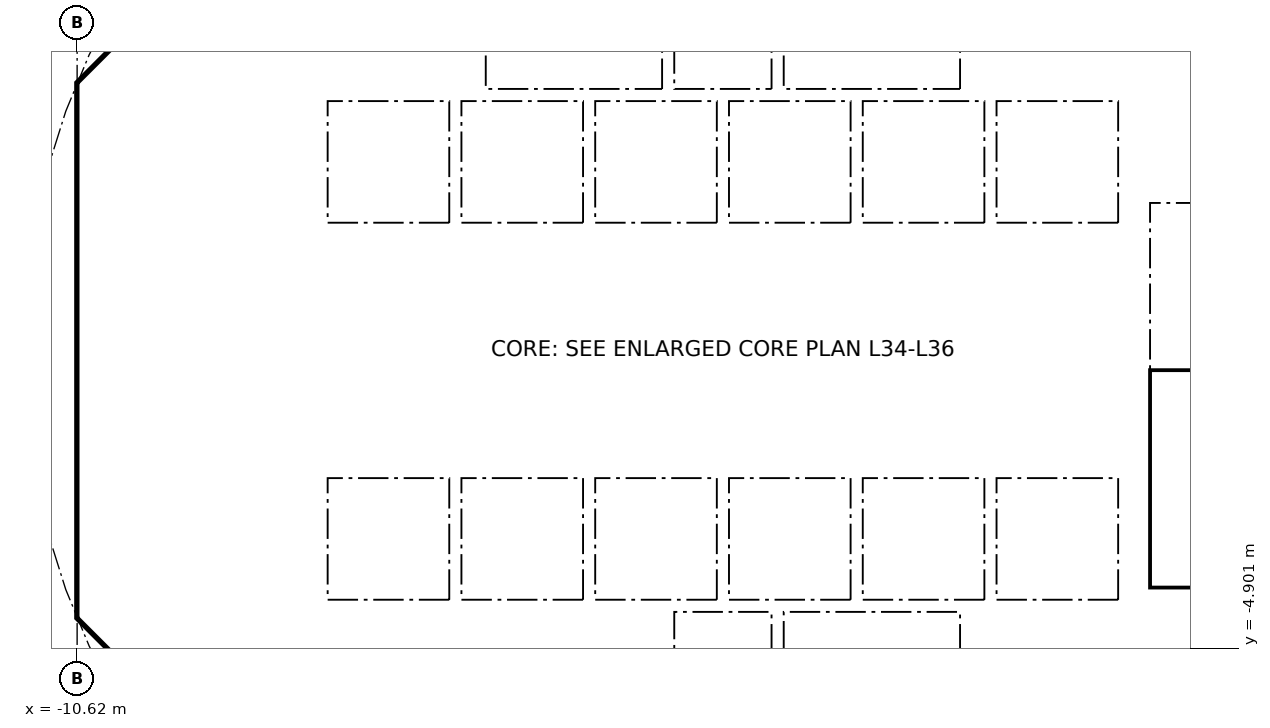
"""IFC4 building model, lengths in metres.
Left out: names, types, materials, properties, quantities, classifications, styles, units other than length and angle.
Written with IfcOpenShell. Run it as: python <this file> out.ifc"""

import sys

from ifc_helpers import new_model, si_unit, direction, frame, frame_2d, origin, place, context, subcontext, project, spatial, polyline, rectangle, outline, extrude, element, fill, save


model = new_model("IFC4")
c1 = context("Model", 3, precision=1e-05, world=origin(), true_north=direction((0.0, 1.0)))
c2 = subcontext(c1, "Body", "Model", "MODEL_VIEW")
j1 = project(units=[si_unit("LENGTHUNIT", "METRE"), si_unit("PLANEANGLEUNIT", "RADIAN")], contexts=[c1])
p1 = place(None, origin())
s1 = spatial("IfcSite", under=j1, at=p1, CompositionType="ELEMENT")
p2 = place(p1, origin())
s2 = spatial("IfcBuilding", under=s1, at=p2, CompositionType="ELEMENT")
p3 = place(p2, frame((0.0, 0.0, 141.8)))
s3 = spatial("IfcBuildingStorey", under=s2, at=p3, CompositionType="ELEMENT", Elevation=141.8)
p4 = place(p3, frame((9.988, 4.613, 0.0), z_axis=(0.0, 0.0, 1.0), x_axis=(-0.707106781187, 0.707106781187, 0.0)))
e1 = element("IfcWall", 1, at=p4, inside=s3, PredefinedType="SHEAR", context=c2, shape_type="SweptSolid", body=[
    extrude(rectangle(XDim=7.602, YDim=0.6, at=frame_2d((3.801, 0.0))), origin(), (0.0, 0.0, 1.0), 3.44),
])
p5 = place(p4, frame((3.201, 0.0, 0.0)))
e2 = element("IfcOpeningElement", 2, at=p5, cuts=e1, PredefinedType="OPENING", context=c2, shape_type="SweptSolid", body=[
    extrude(rectangle(XDim=1.2, YDim=2.1, at=frame_2d((0.6, 1.05))), frame((0.0, 0.31, 0.0), z_axis=(0.0, -1.0, 0.0), x_axis=(1.0, 0.0, 0.0)), (0.0, 0.0, 1.0), 0.62),
])
p6 = place(p3, frame((-4.613, 9.988, 0.0), z_axis=(0.0, 0.0, 1.0), x_axis=(-0.707106781187, -0.707106781187, 0.0)))
e3 = element("IfcWall", 3, at=p6, inside=s3, PredefinedType="SHEAR", context=c2, shape_type="SweptSolid", body=[
    extrude(rectangle(XDim=7.602, YDim=0.6, at=frame_2d((3.801, 0.0))), origin(), (0.0, 0.0, 1.0), 3.44),
])
p7 = place(p6, frame((0.351, 0.0, 0.0)))
e4 = element("IfcOpeningElement", 4, at=p7, cuts=e3, PredefinedType="OPENING", context=c2, shape_type="SweptSolid", body=[
    extrude(rectangle(XDim=1.1, YDim=2.1, at=frame_2d((0.55, 1.05))), frame((0.0, 0.31, 0.0), z_axis=(0.0, -1.0, 0.0), x_axis=(1.0, 0.0, 0.0)), (0.0, 0.0, 1.0), 0.62),
])
p8 = place(p3, frame((-10.325, 3.801, 0.0), z_axis=(0.0, 0.0, 1.0), x_axis=(0.0, -1.0, 0.0)))
e5 = element("IfcWall", 5, at=p8, inside=s3, PredefinedType="SHEAR", context=c2, shape_type="SweptSolid", body=[
    extrude(rectangle(XDim=7.602, YDim=0.6, at=frame_2d((3.801, 0.0))), origin(), (0.0, 0.0, 1.0), 3.44),
])
p9 = place(p8, frame((0.651, 0.0, 0.0)))
e6 = element("IfcOpeningElement", 6, at=p9, cuts=e5, PredefinedType="OPENING", context=c2, shape_type="SweptSolid", body=[
    extrude(rectangle(XDim=1.5, YDim=2.1, at=frame_2d((0.75, 1.05))), frame((0.0, 0.31, 0.0), z_axis=(0.0, -1.0, 0.0), x_axis=(1.0, 0.0, 0.0)), (0.0, 0.0, 1.0), 0.62),
])
p10 = place(p8, frame((5.451, 0.0, 0.0)))
e7 = element("IfcOpeningElement", 7, at=p10, cuts=e5, PredefinedType="OPENING", context=c2, shape_type="SweptSolid", body=[
    extrude(rectangle(XDim=1.5, YDim=2.1, at=frame_2d((0.75, 1.05))), frame((0.0, 0.31, 0.0), z_axis=(0.0, -1.0, 0.0), x_axis=(1.0, 0.0, 0.0)), (0.0, 0.0, 1.0), 0.62),
])
p11 = place(p3, frame((-9.988, -4.613, 0.0), z_axis=(0.0, 0.0, 1.0), x_axis=(0.707106781187, -0.707106781187, 0.0)))
e8 = element("IfcWall", 8, at=p11, inside=s3, PredefinedType="SHEAR", context=c2, shape_type="SweptSolid", body=[
    extrude(rectangle(XDim=7.602, YDim=0.6, at=frame_2d((3.801, 0.0))), origin(), (0.0, 0.0, 1.0), 3.44),
])
p12 = place(p11, frame((6.151, 0.0, 0.0)))
e9 = element("IfcOpeningElement", 9, at=p12, cuts=e8, PredefinedType="OPENING", context=c2, shape_type="SweptSolid", body=[
    extrude(rectangle(XDim=1.1, YDim=2.1, at=frame_2d((0.55, 1.05))), frame((0.0, 0.31, 0.0), z_axis=(0.0, -1.0, 0.0), x_axis=(1.0, 0.0, 0.0)), (0.0, 0.0, 1.0), 0.62),
])
p13 = place(p3, frame((4.613, -9.988, 0.0), z_axis=(0.0, 0.0, 1.0), x_axis=(0.707106781187, 0.707106781187, 0.0)))
e10 = element("IfcWall", 10, at=p13, inside=s3, PredefinedType="SHEAR", context=c2, shape_type="SweptSolid", body=[
    extrude(rectangle(XDim=7.602, YDim=0.6, at=frame_2d((3.801, 0.0))), origin(), (0.0, 0.0, 1.0), 3.44),
])
p14 = place(p13, frame((3.201, 0.0, 0.0)))
e11 = element("IfcOpeningElement", 11, at=p14, cuts=e10, PredefinedType="OPENING", context=c2, shape_type="SweptSolid", body=[
    extrude(rectangle(XDim=1.2, YDim=2.1, at=frame_2d((0.6, 1.05))), frame((0.0, 0.31, 0.0), z_axis=(0.0, -1.0, 0.0), x_axis=(1.0, 0.0, 0.0)), (0.0, 0.0, 1.0), 0.62),
])
p15 = place(p3, frame((-5.8, 4.3, 0.0), z_axis=(0.0, 0.0, 1.0), x_axis=(0.0, 1.0, 0.0)))
e12 = element("IfcWall", 12, at=p15, inside=s3, PredefinedType="PARTITIONING", context=c2, shape_type="SweptSolid", body=[
    extrude(rectangle(XDim=3.927, YDim=0.15, at=frame_2d((1.963, 0.0))), origin(), (0.0, 0.0, 1.0), 3.44),
])
p16 = place(p15, frame((0.413, 0.0, 0.0)))
e13 = element("IfcOpeningElement", 13, at=p16, cuts=e12, PredefinedType="OPENING", context=c2, shape_type="SweptSolid", body=[
    extrude(rectangle(XDim=0.9, YDim=2.1, at=frame_2d((0.45, 1.05))), frame((0.0, 0.085, 0.0), z_axis=(0.0, -1.0, 0.0), x_axis=(1.0, 0.0, 0.0)), (0.0, 0.0, 1.0), 0.17),
])
p17 = place(p15, frame((2.489, 0.0, 0.0)))
e14 = element("IfcOpeningElement", 14, at=p17, cuts=e12, PredefinedType="OPENING", context=c2, shape_type="SweptSolid", body=[
    extrude(rectangle(XDim=0.9, YDim=2.1, at=frame_2d((0.45, 1.05))), frame((0.0, 0.085, 0.0), z_axis=(0.0, -1.0, 0.0), x_axis=(1.0, 0.0, 0.0)), (0.0, 0.0, 1.0), 0.17),
])
p18 = place(p3, frame((4.0, 4.3, 0.0), z_axis=(0.0, 0.0, 1.0), x_axis=(0.0, 1.0, 0.0)))
e15 = element("IfcWall", 15, at=p18, inside=s3, PredefinedType="SOLIDWALL", context=c2, shape_type="SweptSolid", body=[
    extrude(rectangle(XDim=2.2, YDim=0.2, at=frame_2d((1.1, 0.0))), origin(), (0.0, 0.0, 1.0), 3.44),
])
p19 = place(p18, frame((0.55, 0.0, 0.0)))
e16 = element("IfcOpeningElement", 16, at=p19, cuts=e15, PredefinedType="OPENING", context=c2, shape_type="SweptSolid", body=[
    extrude(rectangle(XDim=1.1, YDim=2.1, at=frame_2d((0.55, 1.05))), frame((0.0, 0.11, 0.0), z_axis=(0.0, -1.0, 0.0), x_axis=(1.0, 0.0, 0.0)), (0.0, 0.0, 1.0), 0.22),
])
p20 = place(p3, frame((-4.0, 4.3, 0.0), z_axis=(0.0, 0.0, 1.0), x_axis=(0.0, 1.0, 0.0)))
e17 = element("IfcWall", 17, at=p20, inside=s3, PredefinedType="SOLIDWALL", context=c2, shape_type="SweptSolid", body=[
    extrude(rectangle(XDim=2.2, YDim=0.2, at=frame_2d((1.1, 0.0))), origin(), (0.0, 0.0, 1.0), 3.44),
])
p21 = place(p20, frame((0.55, 0.0, 0.0)))
e18 = element("IfcOpeningElement", 18, at=p21, cuts=e17, PredefinedType="OPENING", context=c2, shape_type="SweptSolid", body=[
    extrude(rectangle(XDim=1.1, YDim=2.1, at=frame_2d((0.55, 1.05))), frame((0.0, 0.11, 0.0), z_axis=(0.0, -1.0, 0.0), x_axis=(1.0, 0.0, 0.0)), (0.0, 0.0, 1.0), 0.22),
])
p22 = place(p3, frame((-6.7, 2.0, 0.0), z_axis=(0.0, 0.0, 1.0), x_axis=(1.0, 0.0, 0.0)))
e19 = element("IfcWall", 19, at=p22, inside=s3, PredefinedType="SOLIDWALL", context=c2, shape_type="SweptSolid", body=[
    extrude(rectangle(XDim=13.4, YDim=0.2, at=frame_2d((6.7, 0.0))), origin(), (0.0, 0.0, 1.0), 3.44),
])
p23 = place(p22, frame((0.65, 0.0, 0.0)))
e20 = element("IfcOpeningElement", 20, at=p23, cuts=e19, PredefinedType="OPENING", context=c2, shape_type="SweptSolid", body=[
    extrude(rectangle(XDim=1.1, YDim=2.1, at=frame_2d((0.55, 1.05))), frame((0.0, 0.11, 0.0), z_axis=(0.0, -1.0, 0.0), x_axis=(1.0, 0.0, 0.0)), (0.0, 0.0, 1.0), 0.22),
])
p24 = place(p22, frame((2.85, 0.0, 0.0)))
e21 = element("IfcOpeningElement", 21, at=p24, cuts=e19, PredefinedType="OPENING", context=c2, shape_type="SweptSolid", body=[
    extrude(rectangle(XDim=1.1, YDim=2.1, at=frame_2d((0.55, 1.05))), frame((0.0, 0.11, 0.0), z_axis=(0.0, -1.0, 0.0), x_axis=(1.0, 0.0, 0.0)), (0.0, 0.0, 1.0), 0.22),
])
p25 = place(p22, frame((5.05, 0.0, 0.0)))
e22 = element("IfcOpeningElement", 22, at=p25, cuts=e19, PredefinedType="OPENING", context=c2, shape_type="SweptSolid", body=[
    extrude(rectangle(XDim=1.1, YDim=2.1, at=frame_2d((0.55, 1.05))), frame((0.0, 0.11, 0.0), z_axis=(0.0, -1.0, 0.0), x_axis=(1.0, 0.0, 0.0)), (0.0, 0.0, 1.0), 0.22),
])
p26 = place(p3, frame((6.7, 4.0, 0.0), z_axis=(0.0, 0.0, 1.0), x_axis=(1.0, 0.0, 0.0)))
e23 = element("IfcWall", 23, at=p26, inside=s3, PredefinedType="SOLIDWALL", context=c2, shape_type="SweptSolid", body=[
    extrude(rectangle(XDim=3.325, YDim=0.2, at=frame_2d((1.662, 0.0))), origin(), (0.0, 0.0, 1.0), 3.44),
])
p27 = place(p26, frame((1.25, 0.0, 0.0)))
e24 = element("IfcOpeningElement", 24, at=p27, cuts=e23, PredefinedType="OPENING", context=c2, shape_type="SweptSolid", body=[
    extrude(rectangle(XDim=1.1, YDim=2.1, at=frame_2d((0.55, 1.05))), frame((0.0, 0.11, 0.0), z_axis=(0.0, -1.0, 0.0), x_axis=(1.0, 0.0, 0.0)), (0.0, 0.0, 1.0), 0.22),
])
p28 = place(p3, frame((-7.0, -7.027, 0.0), z_axis=(0.0, 0.0, 1.0), x_axis=(0.0, 1.0, 0.0)))
e25 = element("IfcWall", 25, at=p28, inside=s3, PredefinedType="PARTITIONING", context=c2, shape_type="SweptSolid", body=[
    extrude(rectangle(XDim=2.927, YDim=0.15, at=frame_2d((1.463, 0.0))), origin(), (0.0, 0.0, 1.0), 3.44),
])
p29 = place(p28, frame((0.976, 0.0, 0.0)))
e26 = element("IfcOpeningElement", 26, at=p29, cuts=e25, PredefinedType="OPENING", context=c2, shape_type="SweptSolid", body=[
    extrude(rectangle(XDim=0.9, YDim=2.1, at=frame_2d((0.45, 1.05))), frame((0.0, 0.085, 0.0), z_axis=(0.0, -1.0, 0.0), x_axis=(1.0, 0.0, 0.0)), (0.0, 0.0, 1.0), 0.17),
])
p30 = place(p3, frame((4.0, -6.5, 0.0), z_axis=(0.0, 0.0, 1.0), x_axis=(0.0, 1.0, 0.0)))
e27 = element("IfcWall", 27, at=p30, inside=s3, PredefinedType="SOLIDWALL", context=c2, shape_type="SweptSolid", body=[
    extrude(rectangle(XDim=2.2, YDim=0.2, at=frame_2d((1.1, 0.0))), origin(), (0.0, 0.0, 1.0), 3.44),
])
p31 = place(p30, frame((0.55, 0.0, 0.0)))
e28 = element("IfcOpeningElement", 28, at=p31, cuts=e27, PredefinedType="OPENING", context=c2, shape_type="SweptSolid", body=[
    extrude(rectangle(XDim=1.1, YDim=2.1, at=frame_2d((0.55, 1.05))), frame((0.0, 0.11, 0.0), z_axis=(0.0, -1.0, 0.0), x_axis=(1.0, 0.0, 0.0)), (0.0, 0.0, 1.0), 0.22),
])
p32 = place(p3, frame((-4.0, -6.5, 0.0), z_axis=(0.0, 0.0, 1.0), x_axis=(0.0, 1.0, 0.0)))
e29 = element("IfcWall", 29, at=p32, inside=s3, PredefinedType="SOLIDWALL", context=c2, shape_type="SweptSolid", body=[
    extrude(rectangle(XDim=2.2, YDim=0.2, at=frame_2d((1.1, 0.0))), origin(), (0.0, 0.0, 1.0), 3.44),
])
p33 = place(p32, frame((0.65, 0.0, 0.0)))
e30 = element("IfcOpeningElement", 30, at=p33, cuts=e29, PredefinedType="OPENING", context=c2, shape_type="SweptSolid", body=[
    extrude(rectangle(XDim=0.9, YDim=2.1, at=frame_2d((0.45, 1.05))), frame((0.0, 0.11, 0.0), z_axis=(0.0, -1.0, 0.0), x_axis=(1.0, 0.0, 0.0)), (0.0, 0.0, 1.0), 0.22),
])
p34 = place(p3, frame((-6.7, -2.0, 0.0), z_axis=(0.0, 0.0, 1.0), x_axis=(1.0, 0.0, 0.0)))
e31 = element("IfcWall", 31, at=p34, inside=s3, PredefinedType="SOLIDWALL", context=c2, shape_type="SweptSolid", body=[
    extrude(rectangle(XDim=13.4, YDim=0.2, at=frame_2d((6.7, 0.0))), origin(), (0.0, 0.0, 1.0), 3.44),
])
p35 = place(p34, frame((0.65, 0.0, 0.0)))
e32 = element("IfcOpeningElement", 32, at=p35, cuts=e31, PredefinedType="OPENING", context=c2, shape_type="SweptSolid", body=[
    extrude(rectangle(XDim=1.1, YDim=2.1, at=frame_2d((0.55, 1.05))), frame((0.0, 0.11, 0.0), z_axis=(0.0, -1.0, 0.0), x_axis=(1.0, 0.0, 0.0)), (0.0, 0.0, 1.0), 0.22),
])
p36 = place(p34, frame((2.85, 0.0, 0.0)))
e33 = element("IfcOpeningElement", 33, at=p36, cuts=e31, PredefinedType="OPENING", context=c2, shape_type="SweptSolid", body=[
    extrude(rectangle(XDim=1.1, YDim=2.1, at=frame_2d((0.55, 1.05))), frame((0.0, 0.11, 0.0), z_axis=(0.0, -1.0, 0.0), x_axis=(1.0, 0.0, 0.0)), (0.0, 0.0, 1.0), 0.22),
])
p37 = place(p3, origin())
e34 = element("IfcWall", 34, at=p37, inside=s3, PredefinedType="SHEAR", context=c2, shape_type="SweptSolid", body=[
    extrude(outline(polyline([(-10.625, -3.801), (-10.025, -3.801), (-10.025, -4.152), (-9.776, -4.401), (-10.2, -4.825), (-10.625, -4.401), (-10.625, -3.801)])), origin(), (0.0, 0.0, 1.0), 3.44),
])
p38 = place(p3, origin())
e35 = element("IfcWall", 35, at=p38, inside=s3, PredefinedType="SHEAR", context=c2, shape_type="SweptSolid", body=[
    extrude(outline(polyline([(-10.2, 4.825), (-9.776, 4.401), (-10.025, 4.152), (-10.025, 3.801), (-10.625, 3.801), (-10.625, 4.401), (-10.2, 4.825)])), origin(), (0.0, 0.0, 1.0), 3.44),
])
for number, where, z_axis, x_axis in (
    (36, (-10.025, -4.0, 0.0), (0.0, 0.0, 1.0), (1.0, 0.0, 0.0)),
    (37, (-10.025, 4.0, 0.0), (0.0, 0.0, 1.0), (1.0, 0.0, 0.0)),
):
    element("IfcWall", number, at=place(p3, frame(where, z_axis=z_axis, x_axis=x_axis)), inside=s3, PredefinedType="PARTITIONING", context=c2, shape_type="SweptSolid", body=[
        extrude(rectangle(XDim=3.325, YDim=0.2, at=frame_2d((1.662, 0.0))), origin(), (0.0, 0.0, 1.0), 3.44),
    ])
for number, where, z_axis, x_axis in (
    (38, (-0.9, -6.5, 0.0), (0.0, 0.0, 1.0), (0.0, 1.0, 0.0)),
    (39, (0.9, -6.5, 0.0), (0.0, 0.0, 1.0), (0.0, 1.0, 0.0)),
):
    element("IfcWall", number, at=place(p3, frame(where, z_axis=z_axis, x_axis=x_axis)), inside=s3, PredefinedType="SOLIDWALL", context=c2, shape_type="SweptSolid", body=[
        extrude(rectangle(XDim=2.2, YDim=0.2, at=frame_2d((1.1, 0.0))), origin(), (0.0, 0.0, 1.0), 3.44),
    ])
p39 = place(p3, origin())
e40 = element("IfcWall", 40, at=p39, inside=s3, PredefinedType="SOLIDWALL", context=c2, shape_type="SweptSolid", body=[
    extrude(outline(polyline([(-6.7, -2.1), (-6.5, -2.1), (-6.5, -4.1), (-4.5, -4.1), (-4.5, -2.1), (-4.3, -2.1), (-4.3, -4.1), (-2.3, -4.1), (-2.3, -2.1), (-2.1, -2.1), (-2.1, -4.1), (-0.1, -4.1), (-0.1, -2.1), (0.1, -2.1), (0.1, -4.1), (2.1, -4.1), (2.1, -2.1), (2.3, -2.1), (2.3, -4.1), (4.3, -4.1), (4.3, -2.1), (4.5, -2.1), (4.5, -4.1), (6.5, -4.1), (6.5, -2.1), (6.7, -2.1), (6.7, -4.3), (-6.7, -4.3), (-6.7, -2.1)])), origin(), (0.0, 0.0, 1.0), 3.44),
])
for number, where, z_axis, x_axis in (
    (41, (-0.9, 4.3, 0.0), (0.0, 0.0, 1.0), (0.0, 1.0, 0.0)),
    (42, (0.9, 4.3, 0.0), (0.0, 0.0, 1.0), (0.0, 1.0, 0.0)),
):
    element("IfcWall", number, at=place(p3, frame(where, z_axis=z_axis, x_axis=x_axis)), inside=s3, PredefinedType="SOLIDWALL", context=c2, shape_type="SweptSolid", body=[
        extrude(rectangle(XDim=2.2, YDim=0.2, at=frame_2d((1.1, 0.0))), origin(), (0.0, 0.0, 1.0), 3.44),
    ])
p40 = place(p3, origin())
e43 = element("IfcWall", 43, at=p40, inside=s3, PredefinedType="SOLIDWALL", context=c2, shape_type="SweptSolid", body=[
    extrude(outline(polyline([(-6.5, 2.1), (-6.7, 2.1), (-6.7, 4.3), (6.7, 4.3), (6.7, 2.1), (6.5, 2.1), (6.5, 4.1), (4.5, 4.1), (4.5, 2.1), (4.3, 2.1), (4.3, 4.1), (2.3, 4.1), (2.3, 2.1), (2.1, 2.1), (2.1, 4.1), (0.1, 4.1), (0.1, 2.1), (-0.1, 2.1), (-0.1, 4.1), (-2.1, 4.1), (-2.1, 2.1), (-2.3, 2.1), (-2.3, 4.1), (-4.3, 4.1), (-4.3, 2.1), (-4.5, 2.1), (-4.5, 4.1), (-6.5, 4.1), (-6.5, 2.1)])), origin(), (0.0, 0.0, 1.0), 3.44),
])
p41 = place(p3, origin())
e44 = element("IfcWall", 44, at=p41, inside=s3, PredefinedType="SOLIDWALL", context=c2, shape_type="SweptSolid", body=[
    extrude(outline(polyline([(7.025, -3.9), (6.7, -3.9), (6.7, 3.9), (7.025, 3.9), (7.025, -3.9)])), origin(), (0.0, 0.0, 1.0), 3.44),
])
p42 = place(p3, origin())
e45 = element("IfcWall", 45, at=p42, inside=s3, PredefinedType="SOLIDWALL", context=c2, shape_type="SweptSolid", body=[
    extrude(outline(polyline([(10.025, -4.1), (6.7, -4.1), (6.7, -3.9), (10.025, -3.9), (10.025, -4.1)])), origin(), (0.0, 0.0, 1.0), 3.44),
])
p43 = place(p23, origin())
e46 = element("IfcDoor", 46, at=p43, inside=s3, OperationType="DOUBLE_DOOR_SLIDING", PredefinedType="DOOR", context=c2, shape_type="SweptSolid", body=[
    extrude(rectangle(XDim=1.1, YDim=2.1, at=frame_2d((0.55, 1.05))), frame((0.0, 0.025, 0.0), z_axis=(0.0, -1.0, 0.0), x_axis=(1.0, 0.0, 0.0)), (0.0, 0.0, 1.0), 0.05),
])
fill(e20, e46)
p44 = place(p24, origin())
e47 = element("IfcDoor", 47, at=p44, inside=s3, OperationType="DOUBLE_DOOR_SLIDING", PredefinedType="DOOR", context=c2, shape_type="SweptSolid", body=[
    extrude(rectangle(XDim=1.1, YDim=2.1, at=frame_2d((0.55, 1.05))), frame((0.0, 0.025, 0.0), z_axis=(0.0, -1.0, 0.0), x_axis=(1.0, 0.0, 0.0)), (0.0, 0.0, 1.0), 0.05),
])
fill(e21, e47)
p45 = place(p25, origin())
e48 = element("IfcDoor", 48, at=p45, inside=s3, OperationType="DOUBLE_DOOR_SLIDING", PredefinedType="DOOR", context=c2, shape_type="SweptSolid", body=[
    extrude(rectangle(XDim=1.1, YDim=2.1, at=frame_2d((0.55, 1.05))), frame((0.0, 0.025, 0.0), z_axis=(0.0, -1.0, 0.0), x_axis=(1.0, 0.0, 0.0)), (0.0, 0.0, 1.0), 0.05),
])
fill(e22, e48)
p46 = place(p35, origin())
e49 = element("IfcDoor", 49, at=p46, inside=s3, OperationType="DOUBLE_DOOR_SLIDING", PredefinedType="DOOR", context=c2, shape_type="SweptSolid", body=[
    extrude(rectangle(XDim=1.1, YDim=2.1, at=frame_2d((0.55, 1.05))), frame((0.0, 0.025, 0.0), z_axis=(0.0, -1.0, 0.0), x_axis=(1.0, 0.0, 0.0)), (0.0, 0.0, 1.0), 0.05),
])
fill(e32, e49)
p47 = place(p36, origin())
e50 = element("IfcDoor", 50, at=p47, inside=s3, OperationType="DOUBLE_DOOR_SLIDING", PredefinedType="DOOR", context=c2, shape_type="SweptSolid", body=[
    extrude(rectangle(XDim=1.1, YDim=2.1, at=frame_2d((0.55, 1.05))), frame((0.0, 0.025, 0.0), z_axis=(0.0, -1.0, 0.0), x_axis=(1.0, 0.0, 0.0)), (0.0, 0.0, 1.0), 0.05),
])
fill(e33, e50)
p48 = place(p19, origin())
e51 = element("IfcDoor", 51, at=p48, inside=s3, OperationType="DOUBLE_DOOR_SLIDING", PredefinedType="DOOR", context=c2, shape_type="SweptSolid", body=[
    extrude(rectangle(XDim=1.1, YDim=2.1, at=frame_2d((0.55, 1.05))), frame((0.0, 0.025, 0.0), z_axis=(0.0, -1.0, 0.0), x_axis=(1.0, 0.0, 0.0)), (0.0, 0.0, 1.0), 0.05),
])
fill(e16, e51)
p49 = place(p31, origin())
e52 = element("IfcDoor", 52, at=p49, inside=s3, OperationType="DOUBLE_DOOR_SLIDING", PredefinedType="DOOR", context=c2, shape_type="SweptSolid", body=[
    extrude(rectangle(XDim=1.1, YDim=2.1, at=frame_2d((0.55, 1.05))), frame((0.0, 0.025, 0.0), z_axis=(0.0, -1.0, 0.0), x_axis=(1.0, 0.0, 0.0)), (0.0, 0.0, 1.0), 0.05),
])
fill(e28, e52)
p50 = place(p21, origin())
e53 = element("IfcDoor", 53, at=p50, inside=s3, OperationType="DOUBLE_DOOR_SLIDING", PredefinedType="DOOR", context=c2, shape_type="SweptSolid", body=[
    extrude(rectangle(XDim=1.1, YDim=2.1, at=frame_2d((0.55, 1.05))), frame((0.0, 0.025, 0.0), z_axis=(0.0, -1.0, 0.0), x_axis=(1.0, 0.0, 0.0)), (0.0, 0.0, 1.0), 0.05),
])
fill(e18, e53)
p51 = place(p16, origin())
e54 = element("IfcDoor", 54, at=p51, inside=s3, OperationType="SINGLE_SWING_RIGHT", PredefinedType="DOOR", context=c2, shape_type="SweptSolid", body=[
    extrude(rectangle(XDim=0.9, YDim=2.1, at=frame_2d((0.45, 1.05))), frame((0.0, 0.025, 0.0), z_axis=(0.0, -1.0, 0.0), x_axis=(1.0, 0.0, 0.0)), (0.0, 0.0, 1.0), 0.05),
])
fill(e13, e54)
p52 = place(p9, origin())
e55 = element("IfcDoor", 55, at=p52, inside=s3, OperationType="DOUBLE_DOOR_SINGLE_SWING", PredefinedType="DOOR", context=c2, shape_type="SweptSolid", body=[
    extrude(rectangle(XDim=1.5, YDim=2.1, at=frame_2d((0.75, 1.05))), frame((0.0, 0.025, 0.0), z_axis=(0.0, -1.0, 0.0), x_axis=(1.0, 0.0, 0.0)), (0.0, 0.0, 1.0), 0.05),
])
fill(e6, e55)
p53 = place(p10, origin())
e56 = element("IfcDoor", 56, at=p53, inside=s3, OperationType="DOUBLE_DOOR_SINGLE_SWING", PredefinedType="DOOR", context=c2, shape_type="SweptSolid", body=[
    extrude(rectangle(XDim=1.5, YDim=2.1, at=frame_2d((0.75, 1.05))), frame((0.0, 0.025, 0.0), z_axis=(0.0, -1.0, 0.0), x_axis=(1.0, 0.0, 0.0)), (0.0, 0.0, 1.0), 0.05),
])
fill(e7, e56)
save(model, sys.argv[1])
